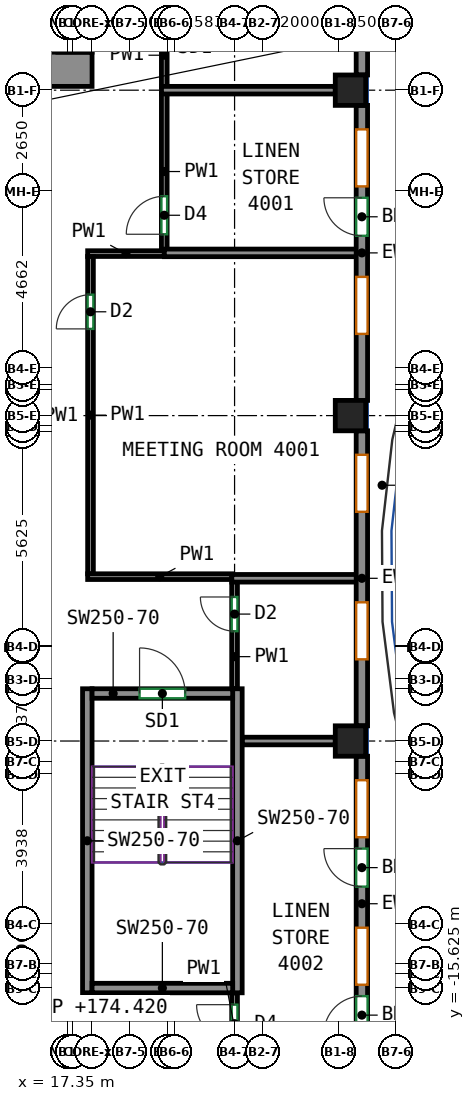
"""IFC4 building model, lengths in metres.
Left out: names, types, materials, properties, quantities, classifications, styles, units other than length and angle.
Written with IfcOpenShell. Run it as: python <this file> out.ifc"""

import sys

from ifc_helpers import new_model, si_unit, direction, frame, frame_2d, origin, origin_2d, place, context, subcontext, project, spatial, rectangle, extrude, source, transform, mapped, element, fill, save


model = new_model("IFC4")
c1 = context("Model", 3, precision=1e-05, world=origin(), true_north=direction((0.0, 1.0)))
c2 = subcontext(c1, "Body", "Model", "MODEL_VIEW")
j1 = project(units=[si_unit("LENGTHUNIT", "METRE"), si_unit("PLANEANGLEUNIT", "RADIAN")], contexts=[c1])
p1 = place(None, origin())
s1 = spatial("IfcSite", under=j1, at=p1, CompositionType="ELEMENT")
p2 = place(p1, origin())
s2 = spatial("IfcBuilding", under=s1, at=p2, CompositionType="ELEMENT")
p3 = place(p2, frame((0.0, 0.0, 171.9)))
s3 = spatial("IfcBuildingStorey", under=s2, at=p3, CompositionType="ELEMENT", Elevation=171.9)
m1 = source(origin(), c2, "Body", "SweptSolid", [
    extrude(rectangle(XDim=0.8, YDim=0.8, at=origin_2d()), origin(), (0.0, 0.0, 1.0), 3.12),
])
for number, where, z_axis, x_axis in (
    (1, (24.8, -9.125, 0.0), (0.0, 0.0, 1.0), (1.0, 0.0, 0.0)),
    (2, (24.8, -0.562, 0.0), (0.0, 0.0, 1.0), (1.0, 0.0, 0.0)),
    (3, (24.8, 8.0, 0.0), (0.0, 0.0, 1.0), (1.0, 0.0, 0.0)),
):
    element("IfcColumn", number, at=place(p3, frame(where, z_axis=z_axis, x_axis=x_axis)), inside=s3, PredefinedType="COLUMN", context=c2, shape_type="MappedRepresentation", body=[
        mapped(m1, transform((0.0, 0.0, 0.0))),
    ])
m2 = source(origin(), c2, "Body", "SweptSolid", [
    extrude(rectangle(XDim=5.53, YDim=0.9, at=frame_2d((2.765, 0.0))), origin(), (0.0, 0.0, 1.0), 3.12),
])
p4 = place(p3, frame((12.47, 8.55, 0.0), z_axis=(0.0, 0.0, 1.0), x_axis=(1.0, 0.0, 0.0)))
e4 = element("IfcWall", 4, at=p4, inside=s3, PredefinedType="SHEAR", context=c2, shape_type="MappedRepresentation", body=[
    mapped(m2, transform((0.0, 0.0, 0.0))),
])
p5 = place(p4, frame((2.18, 0.0, 0.0)))
e5 = element("IfcOpeningElement", 5, at=p5, cuts=e4, PredefinedType="OPENING", context=c2, shape_type="SweptSolid", body=[
    extrude(rectangle(XDim=1.2, YDim=2.1, at=frame_2d((0.6, 1.05))), frame((0.0, 0.46, 0.0), z_axis=(0.0, -1.0, 0.0), x_axis=(1.0, 0.0, 0.0)), (0.0, 0.0, 1.0), 0.92),
])
m3 = source(origin(), c2, "Body", "SweptSolid", [
    extrude(rectangle(XDim=8.0, YDim=0.25, at=frame_2d((4.0, 0.0))), origin(), (0.0, 0.0, 1.0), 3.12),
])
for number, where, z_axis, x_axis in (
    (6, (17.875, -15.75, 0.0), (0.0, 0.0, 1.0), (0.0, 1.0, 0.0)),
    (7, (21.825, -15.75, 0.0), (0.0, 0.0, 1.0), (0.0, 1.0, 0.0)),
):
    element("IfcWall", number, at=place(p3, frame(where, z_axis=z_axis, x_axis=x_axis)), inside=s3, PredefinedType="SHEAR", context=c2, shape_type="MappedRepresentation", body=[
        mapped(m3, transform((0.0, 0.0, 0.0))),
    ])
m4 = source(origin(), c2, "Body", "SweptSolid", [
    extrude(rectangle(XDim=3.7, YDim=0.25, at=frame_2d((1.85, 0.0))), origin(), (0.0, 0.0, 1.0), 3.12),
])
p6 = place(p3, frame((18.0, -15.625, 0.0), z_axis=(0.0, 0.0, 1.0), x_axis=(1.0, 0.0, 0.0)))
e8 = element("IfcWall", 8, at=p6, inside=s3, PredefinedType="SHEAR", context=c2, shape_type="MappedRepresentation", body=[
    mapped(m4, transform((0.0, 0.0, 0.0))),
])
p7 = place(p3, frame((18.0, -7.875, 0.0), z_axis=(0.0, 0.0, 1.0), x_axis=(1.0, 0.0, 0.0)))
e9 = element("IfcWall", 9, at=p7, inside=s3, PredefinedType="SHEAR", context=c2, shape_type="MappedRepresentation", body=[
    mapped(m4, transform((0.0, 0.0, 0.0))),
])
p8 = place(p7, frame((1.25, 0.0, 0.0)))
e10 = element("IfcOpeningElement", 10, at=p8, cuts=e9, PredefinedType="OPENING", context=c2, shape_type="SweptSolid", body=[
    extrude(rectangle(XDim=1.2, YDim=2.1, at=frame_2d((0.6, 1.05))), frame((0.0, 0.135, 0.0), z_axis=(0.0, -1.0, 0.0), x_axis=(1.0, 0.0, 0.0)), (0.0, 0.0, 1.0), 0.27),
])
m5 = source(origin(), c2, "Body", "SweptSolid", [
    extrude(rectangle(XDim=7.763, YDim=0.3, at=frame_2d((3.881, 0.0))), origin(), (0.0, 0.0, 1.0), 3.12),
])
p9 = place(p3, frame((25.1, -17.288, 0.0), z_axis=(0.0, 0.0, 1.0), x_axis=(0.0, 1.0, 0.0)))
e11 = element("IfcWall", 11, at=p9, inside=s3, PredefinedType="SOLIDWALL", context=c2, shape_type="MappedRepresentation", body=[
    mapped(m5, transform((0.0, 0.0, 0.0))),
])
p10 = place(p9, frame((1.75, 0.0, 0.85)))
e12 = element("IfcOpeningElement", 12, at=p10, cuts=e11, PredefinedType="OPENING", context=c2, shape_type="SweptSolid", body=[
    extrude(rectangle(XDim=1.5, YDim=1.95, at=frame_2d((0.75, 0.975))), frame((0.0, 0.16, 0.0), z_axis=(0.0, -1.0, 0.0), x_axis=(1.0, 0.0, 0.0)), (0.0, 0.0, 1.0), 0.32),
])
p11 = place(p9, frame((0.45, 0.0, 0.0)))
e13 = element("IfcOpeningElement", 13, at=p11, cuts=e11, PredefinedType="OPENING", context=c2, shape_type="SweptSolid", body=[
    extrude(rectangle(XDim=1.0, YDim=2.1, at=frame_2d((0.5, 1.05))), frame((0.0, 0.16, 0.0), z_axis=(0.0, -1.0, 0.0), x_axis=(1.0, 0.0, 0.0)), (0.0, 0.0, 1.0), 0.32),
])
p12 = place(p9, frame((5.631, 0.0, 0.85)))
e14 = element("IfcOpeningElement", 14, at=p12, cuts=e11, PredefinedType="OPENING", context=c2, shape_type="SweptSolid", body=[
    extrude(rectangle(XDim=1.5, YDim=1.95, at=frame_2d((0.75, 0.975))), frame((0.0, 0.16, 0.0), z_axis=(0.0, -1.0, 0.0), x_axis=(1.0, 0.0, 0.0)), (0.0, 0.0, 1.0), 0.32),
])
p13 = place(p9, frame((4.331, 0.0, 0.0)))
e15 = element("IfcOpeningElement", 15, at=p13, cuts=e11, PredefinedType="OPENING", context=c2, shape_type="SweptSolid", body=[
    extrude(rectangle(XDim=1.0, YDim=2.1, at=frame_2d((0.5, 1.05))), frame((0.0, 0.16, 0.0), z_axis=(0.0, -1.0, 0.0), x_axis=(1.0, 0.0, 0.0)), (0.0, 0.0, 1.0), 0.32),
])
p14 = place(p3, frame((25.1, -8.725, 0.0), z_axis=(0.0, 0.0, 1.0), x_axis=(0.0, 1.0, 0.0)))
e16 = element("IfcWall", 16, at=p14, inside=s3, PredefinedType="SOLIDWALL", context=c2, shape_type="MappedRepresentation", body=[
    mapped(m5, transform((0.0, 0.0, 0.0))),
])
p15 = place(p14, frame((1.75, 0.0, 0.85)))
e17 = element("IfcOpeningElement", 17, at=p15, cuts=e16, PredefinedType="OPENING", context=c2, shape_type="SweptSolid", body=[
    extrude(rectangle(XDim=1.5, YDim=1.95, at=frame_2d((0.75, 0.975))), frame((0.0, 0.16, 0.0), z_axis=(0.0, -1.0, 0.0), x_axis=(1.0, 0.0, 0.0)), (0.0, 0.0, 1.0), 0.32),
])
p16 = place(p14, frame((5.631, 0.0, 0.85)))
e18 = element("IfcOpeningElement", 18, at=p16, cuts=e16, PredefinedType="OPENING", context=c2, shape_type="SweptSolid", body=[
    extrude(rectangle(XDim=1.5, YDim=1.95, at=frame_2d((0.75, 0.975))), frame((0.0, 0.16, 0.0), z_axis=(0.0, -1.0, 0.0), x_axis=(1.0, 0.0, 0.0)), (0.0, 0.0, 1.0), 0.32),
])
p17 = place(p3, frame((25.1, -0.163, 0.0), z_axis=(0.0, 0.0, 1.0), x_axis=(0.0, 1.0, 0.0)))
e19 = element("IfcWall", 19, at=p17, inside=s3, PredefinedType="SOLIDWALL", context=c2, shape_type="MappedRepresentation", body=[
    mapped(m5, transform((0.0, 0.0, 0.0))),
])
p18 = place(p17, frame((1.75, 0.0, 0.85)))
e20 = element("IfcOpeningElement", 20, at=p18, cuts=e19, PredefinedType="OPENING", context=c2, shape_type="SweptSolid", body=[
    extrude(rectangle(XDim=1.5, YDim=1.95, at=frame_2d((0.75, 0.975))), frame((0.0, 0.16, 0.0), z_axis=(0.0, -1.0, 0.0), x_axis=(1.0, 0.0, 0.0)), (0.0, 0.0, 1.0), 0.32),
])
p19 = place(p17, frame((5.631, 0.0, 0.85)))
e21 = element("IfcOpeningElement", 21, at=p19, cuts=e19, PredefinedType="OPENING", context=c2, shape_type="SweptSolid", body=[
    extrude(rectangle(XDim=1.5, YDim=1.95, at=frame_2d((0.75, 0.975))), frame((0.0, 0.16, 0.0), z_axis=(0.0, -1.0, 0.0), x_axis=(1.0, 0.0, 0.0)), (0.0, 0.0, 1.0), 0.32),
])
p20 = place(p17, frame((4.331, 0.0, 0.0)))
e22 = element("IfcOpeningElement", 22, at=p20, cuts=e19, PredefinedType="OPENING", context=c2, shape_type="SweptSolid", body=[
    extrude(rectangle(XDim=1.0, YDim=2.1, at=frame_2d((0.5, 1.05))), frame((0.0, 0.16, 0.0), z_axis=(0.0, -1.0, 0.0), x_axis=(1.0, 0.0, 0.0)), (0.0, 0.0, 1.0), 0.32),
])
m6 = source(origin(), c2, "Body", "SweptSolid", [
    extrude(rectangle(XDim=13.95, YDim=0.3, at=frame_2d((6.975, 0.0))), origin(), (0.0, 0.0, 1.0), 3.12),
])
p21 = place(p3, frame((25.1, 8.4, 0.0), z_axis=(0.0, 0.0, 1.0), x_axis=(0.0, 1.0, 0.0)))
e23 = element("IfcWall", 23, at=p21, inside=s3, PredefinedType="SOLIDWALL", context=c2, shape_type="MappedRepresentation", body=[
    mapped(m6, transform((0.0, 0.0, 0.0))),
])
p22 = place(p21, frame((0.994, 0.0, 0.85)))
e24 = element("IfcOpeningElement", 24, at=p22, cuts=e23, PredefinedType="OPENING", context=c2, shape_type="SweptSolid", body=[
    extrude(rectangle(XDim=1.5, YDim=1.95, at=frame_2d((0.75, 0.975))), frame((0.0, 0.16, 0.0), z_axis=(0.0, -1.0, 0.0), x_axis=(1.0, 0.0, 0.0)), (0.0, 0.0, 1.0), 0.32),
])
p23 = place(p21, frame((4.481, 0.0, 0.85)))
e25 = element("IfcOpeningElement", 25, at=p23, cuts=e23, PredefinedType="OPENING", context=c2, shape_type="SweptSolid", body=[
    extrude(rectangle(XDim=1.5, YDim=1.95, at=frame_2d((0.75, 0.975))), frame((0.0, 0.16, 0.0), z_axis=(0.0, -1.0, 0.0), x_axis=(1.0, 0.0, 0.0)), (0.0, 0.0, 1.0), 0.32),
])
p24 = place(p21, frame((7.969, 0.0, 0.85)))
e26 = element("IfcOpeningElement", 26, at=p24, cuts=e23, PredefinedType="OPENING", context=c2, shape_type="SweptSolid", body=[
    extrude(rectangle(XDim=1.5, YDim=1.95, at=frame_2d((0.75, 0.975))), frame((0.0, 0.16, 0.0), z_axis=(0.0, -1.0, 0.0), x_axis=(1.0, 0.0, 0.0)), (0.0, 0.0, 1.0), 0.32),
])
p25 = place(p21, frame((11.456, 0.0, 0.85)))
e27 = element("IfcOpeningElement", 27, at=p25, cuts=e23, PredefinedType="OPENING", context=c2, shape_type="SweptSolid", body=[
    extrude(rectangle(XDim=1.5, YDim=1.95, at=frame_2d((0.75, 0.975))), frame((0.0, 0.16, 0.0), z_axis=(0.0, -1.0, 0.0), x_axis=(1.0, 0.0, 0.0)), (0.0, 0.0, 1.0), 0.32),
])
p26 = place(p3, frame((19.9, 3.809, 0.0), z_axis=(0.0, 0.0, 1.0), x_axis=(0.0, 1.0, 0.0)))
e28 = element("IfcWall", 28, at=p26, inside=s3, PredefinedType="PARTITIONING", context=c2, shape_type="SweptSolid", body=[
    extrude(rectangle(XDim=4.101, YDim=0.15, at=frame_2d((2.05, 0.0))), origin(), (0.0, 0.0, 1.0), 3.12),
])
p27 = place(p26, frame((0.4, 0.0, 0.0)))
e29 = element("IfcOpeningElement", 29, at=p27, cuts=e28, PredefinedType="OPENING", context=c2, shape_type="SweptSolid", body=[
    extrude(rectangle(XDim=1.0, YDim=2.1, at=frame_2d((0.5, 1.05))), frame((0.0, 0.085, 0.0), z_axis=(0.0, -1.0, 0.0), x_axis=(1.0, 0.0, 0.0)), (0.0, 0.0, 1.0), 0.17),
])
p28 = place(p3, frame((19.9, 8.09, 0.0), z_axis=(0.0, 0.0, 1.0), x_axis=(0.0, 1.0, 0.0)))
e30 = element("IfcWall", 30, at=p28, inside=s3, PredefinedType="PARTITIONING", context=c2, shape_type="SweptSolid", body=[
    extrude(rectangle(XDim=1.66, YDim=0.15, at=frame_2d((0.83, 0.0))), origin(), (0.0, 0.0, 1.0), 3.12),
])
p29 = place(p3, frame((17.884, 3.7, 0.0), z_axis=(0.0, 0.0, 1.0), x_axis=(1.0, 0.0, 0.0)))
e31 = element("IfcWall", 31, at=p29, inside=s3, PredefinedType="PARTITIONING", context=c2, shape_type="SweptSolid", body=[
    extrude(rectangle(XDim=2.016, YDim=0.15, at=frame_2d((1.008, 0.0))), origin(), (0.0, 0.0, 1.0), 3.12),
])
p30 = place(p3, frame((17.959, -4.725, 0.0), z_axis=(0.0, 0.0, 1.0), x_axis=(0.0, 1.0, 0.0)))
e32 = element("IfcWall", 32, at=p30, inside=s3, PredefinedType="PARTITIONING", context=c2, shape_type="SweptSolid", body=[
    extrude(rectangle(XDim=8.35, YDim=0.15, at=frame_2d((4.175, 0.0))), origin(), (0.0, 0.0, 1.0), 3.12),
])
p31 = place(p30, frame((6.444, 0.0, 0.0)))
e33 = element("IfcOpeningElement", 33, at=p31, cuts=e32, PredefinedType="OPENING", context=c2, shape_type="SweptSolid", body=[
    extrude(rectangle(XDim=0.9, YDim=2.1, at=frame_2d((0.45, 1.05))), frame((0.0, 0.085, 0.0), z_axis=(0.0, -1.0, 0.0), x_axis=(1.0, 0.0, 0.0)), (0.0, 0.0, 1.0), 0.17),
])
p32 = place(p3, frame((17.884, -4.8, 0.0), z_axis=(0.0, 0.0, 1.0), x_axis=(1.0, 0.0, 0.0)))
e34 = element("IfcWall", 34, at=p32, inside=s3, PredefinedType="PARTITIONING", context=c2, shape_type="SweptSolid", body=[
    extrude(rectangle(XDim=3.793, YDim=0.15, at=frame_2d((1.896, 0.0))), origin(), (0.0, 0.0, 1.0), 3.12),
])
p33 = place(p3, frame((21.75, -7.75, 0.0), z_axis=(0.0, 0.0, 1.0), x_axis=(0.0, 1.0, 0.0)))
e35 = element("IfcWall", 35, at=p33, inside=s3, PredefinedType="PARTITIONING", context=c2, shape_type="SweptSolid", body=[
    extrude(rectangle(XDim=2.817, YDim=0.15, at=frame_2d((1.408, 0.0))), origin(), (0.0, 0.0, 1.0), 3.12),
])
p34 = place(p33, frame((1.515, 0.0, 0.0)))
e36 = element("IfcOpeningElement", 36, at=p34, cuts=e35, PredefinedType="OPENING", context=c2, shape_type="SweptSolid", body=[
    extrude(rectangle(XDim=0.9, YDim=2.1, at=frame_2d((0.45, 1.05))), frame((0.0, 0.085, 0.0), z_axis=(0.0, -1.0, 0.0), x_axis=(1.0, 0.0, 0.0)), (0.0, 0.0, 1.0), 0.17),
])
p35 = place(p3, frame((21.75, -17.598, 0.0), z_axis=(0.0, 0.0, 1.0), x_axis=(0.0, 1.0, 0.0)))
e37 = element("IfcWall", 37, at=p35, inside=s3, PredefinedType="PARTITIONING", context=c2, shape_type="SweptSolid", body=[
    extrude(rectangle(XDim=1.848, YDim=0.15, at=frame_2d((0.924, 0.0))), origin(), (0.0, 0.0, 1.0), 3.12),
])
p36 = place(p35, frame((0.536, 0.0, 0.0)))
e38 = element("IfcOpeningElement", 38, at=p36, cuts=e37, PredefinedType="OPENING", context=c2, shape_type="SweptSolid", body=[
    extrude(rectangle(XDim=1.0, YDim=2.1, at=frame_2d((0.5, 1.05))), frame((0.0, 0.085, 0.0), z_axis=(0.0, -1.0, 0.0), x_axis=(1.0, 0.0, 0.0)), (0.0, 0.0, 1.0), 0.17),
])
p37 = place(p3, frame((19.827, 8.0, 0.0), z_axis=(0.0, 0.0, 1.0), x_axis=(1.0, 0.0, 0.0)))
e39 = element("IfcWall", 39, at=p37, inside=s3, PredefinedType="PARTITIONING", context=c2, shape_type="SweptSolid", body=[
    extrude(rectangle(XDim=4.573, YDim=0.2, at=frame_2d((2.287, 0.0))), origin(), (0.0, 0.0, 1.0), 3.12),
])
p38 = place(p3, frame((19.902, 3.719, 0.0), z_axis=(0.0, 0.0, 1.0), x_axis=(1.0, 0.0, 0.0)))
e40 = element("IfcWall", 40, at=p38, inside=s3, PredefinedType="PARTITIONING", context=c2, shape_type="SweptSolid", body=[
    extrude(rectangle(XDim=5.098, YDim=0.2, at=frame_2d((2.549, 0.0))), origin(), (0.0, 0.0, 1.0), 3.12),
])
p39 = place(p3, frame((21.677, -4.843, 0.0), z_axis=(0.0, 0.0, 1.0), x_axis=(1.0, 0.0, 0.0)))
e41 = element("IfcWall", 41, at=p39, inside=s3, PredefinedType="PARTITIONING", context=c2, shape_type="SweptSolid", body=[
    extrude(rectangle(XDim=3.323, YDim=0.2, at=frame_2d((1.662, 0.0))), origin(), (0.0, 0.0, 1.0), 3.12),
])
p40 = place(p3, frame((21.95, -9.125, 0.0), z_axis=(0.0, 0.0, 1.0), x_axis=(1.0, 0.0, 0.0)))
e42 = element("IfcWall", 42, at=p40, inside=s3, PredefinedType="PARTITIONING", context=c2, shape_type="SweptSolid", body=[
    extrude(rectangle(XDim=2.45, YDim=0.2, at=frame_2d((1.225, 0.0))), origin(), (0.0, 0.0, 1.0), 3.12),
])
p41 = place(p10, origin())
e43 = element("IfcWindow", 43, at=p41, inside=s3, PartitioningType="SINGLE_PANEL", PredefinedType="WINDOW", context=c2, shape_type="SweptSolid", body=[
    extrude(rectangle(XDim=1.5, YDim=1.95, at=frame_2d((0.75, 0.975))), frame((0.0, 0.03, 0.0), z_axis=(0.0, -1.0, 0.0), x_axis=(1.0, 0.0, 0.0)), (0.0, 0.0, 1.0), 0.06),
])
fill(e12, e43)
p42 = place(p11, origin())
e44 = element("IfcDoor", 44, at=p42, inside=s3, OperationType="SINGLE_SWING_LEFT", PredefinedType="DOOR", context=c2, shape_type="SweptSolid", body=[
    extrude(rectangle(XDim=1.0, YDim=2.1, at=frame_2d((0.5, 1.05))), frame((0.0, 0.025, 0.0), z_axis=(0.0, -1.0, 0.0), x_axis=(1.0, 0.0, 0.0)), (0.0, 0.0, 1.0), 0.05),
])
fill(e13, e44)
p43 = place(p12, origin())
e45 = element("IfcWindow", 45, at=p43, inside=s3, PartitioningType="SINGLE_PANEL", PredefinedType="WINDOW", context=c2, shape_type="SweptSolid", body=[
    extrude(rectangle(XDim=1.5, YDim=1.95, at=frame_2d((0.75, 0.975))), frame((0.0, 0.03, 0.0), z_axis=(0.0, -1.0, 0.0), x_axis=(1.0, 0.0, 0.0)), (0.0, 0.0, 1.0), 0.06),
])
fill(e14, e45)
p44 = place(p13, origin())
e46 = element("IfcDoor", 46, at=p44, inside=s3, OperationType="SINGLE_SWING_RIGHT", PredefinedType="DOOR", context=c2, shape_type="SweptSolid", body=[
    extrude(rectangle(XDim=1.0, YDim=2.1, at=frame_2d((0.5, 1.05))), frame((0.0, 0.025, 0.0), z_axis=(0.0, -1.0, 0.0), x_axis=(1.0, 0.0, 0.0)), (0.0, 0.0, 1.0), 0.05),
])
fill(e15, e46)
p45 = place(p15, origin())
e47 = element("IfcWindow", 47, at=p45, inside=s3, PartitioningType="SINGLE_PANEL", PredefinedType="WINDOW", context=c2, shape_type="SweptSolid", body=[
    extrude(rectangle(XDim=1.5, YDim=1.95, at=frame_2d((0.75, 0.975))), frame((0.0, 0.03, 0.0), z_axis=(0.0, -1.0, 0.0), x_axis=(1.0, 0.0, 0.0)), (0.0, 0.0, 1.0), 0.06),
])
fill(e17, e47)
p46 = place(p16, origin())
e48 = element("IfcWindow", 48, at=p46, inside=s3, PartitioningType="SINGLE_PANEL", PredefinedType="WINDOW", context=c2, shape_type="SweptSolid", body=[
    extrude(rectangle(XDim=1.5, YDim=1.95, at=frame_2d((0.75, 0.975))), frame((0.0, 0.03, 0.0), z_axis=(0.0, -1.0, 0.0), x_axis=(1.0, 0.0, 0.0)), (0.0, 0.0, 1.0), 0.06),
])
fill(e18, e48)
p47 = place(p18, origin())
e49 = element("IfcWindow", 49, at=p47, inside=s3, PartitioningType="SINGLE_PANEL", PredefinedType="WINDOW", context=c2, shape_type="SweptSolid", body=[
    extrude(rectangle(XDim=1.5, YDim=1.95, at=frame_2d((0.75, 0.975))), frame((0.0, 0.03, 0.0), z_axis=(0.0, -1.0, 0.0), x_axis=(1.0, 0.0, 0.0)), (0.0, 0.0, 1.0), 0.06),
])
fill(e20, e49)
p48 = place(p19, origin())
e50 = element("IfcWindow", 50, at=p48, inside=s3, PartitioningType="SINGLE_PANEL", PredefinedType="WINDOW", context=c2, shape_type="SweptSolid", body=[
    extrude(rectangle(XDim=1.5, YDim=1.95, at=frame_2d((0.75, 0.975))), frame((0.0, 0.03, 0.0), z_axis=(0.0, -1.0, 0.0), x_axis=(1.0, 0.0, 0.0)), (0.0, 0.0, 1.0), 0.06),
])
fill(e21, e50)
p49 = place(p20, origin())
e51 = element("IfcDoor", 51, at=p49, inside=s3, OperationType="SINGLE_SWING_RIGHT", PredefinedType="DOOR", context=c2, shape_type="SweptSolid", body=[
    extrude(rectangle(XDim=1.0, YDim=2.1, at=frame_2d((0.5, 1.05))), frame((0.0, 0.025, 0.0), z_axis=(0.0, -1.0, 0.0), x_axis=(1.0, 0.0, 0.0)), (0.0, 0.0, 1.0), 0.05),
])
fill(e22, e51)
p50 = place(p8, origin())
e52 = element("IfcDoor", 52, at=p50, inside=s3, OperationType="DOUBLE_DOOR_SINGLE_SWING", PredefinedType="DOOR", context=c2, shape_type="SweptSolid", body=[
    extrude(rectangle(XDim=1.2, YDim=2.1, at=frame_2d((0.6, 1.05))), frame((0.0, 0.025, 0.0), z_axis=(0.0, -1.0, 0.0), x_axis=(1.0, 0.0, 0.0)), (0.0, 0.0, 1.0), 0.05),
])
fill(e10, e52)
p51 = place(p36, origin())
e53 = element("IfcDoor", 53, at=p51, inside=s3, OperationType="SINGLE_SWING_RIGHT", PredefinedType="DOOR", context=c2, shape_type="SweptSolid", body=[
    extrude(rectangle(XDim=1.0, YDim=2.1, at=frame_2d((0.5, 1.05))), frame((0.0, 0.025, 0.0), z_axis=(0.0, -1.0, 0.0), x_axis=(1.0, 0.0, 0.0)), (0.0, 0.0, 1.0), 0.05),
])
fill(e38, e53)
p52 = place(p34, origin())
e54 = element("IfcDoor", 54, at=p52, inside=s3, OperationType="SINGLE_SWING_RIGHT", PredefinedType="DOOR", context=c2, shape_type="SweptSolid", body=[
    extrude(rectangle(XDim=0.9, YDim=2.1, at=frame_2d((0.45, 1.05))), frame((0.0, 0.025, 0.0), z_axis=(0.0, -1.0, 0.0), x_axis=(1.0, 0.0, 0.0)), (0.0, 0.0, 1.0), 0.05),
])
fill(e36, e54)
p53 = place(p31, origin())
e55 = element("IfcDoor", 55, at=p53, inside=s3, OperationType="SINGLE_SWING_LEFT", PredefinedType="DOOR", context=c2, shape_type="SweptSolid", body=[
    extrude(rectangle(XDim=0.9, YDim=2.1, at=frame_2d((0.45, 1.05))), frame((0.0, 0.025, 0.0), z_axis=(0.0, -1.0, 0.0), x_axis=(1.0, 0.0, 0.0)), (0.0, 0.0, 1.0), 0.05),
])
fill(e33, e55)
p54 = place(p27, origin())
e56 = element("IfcDoor", 56, at=p54, inside=s3, OperationType="SINGLE_SWING_LEFT", PredefinedType="DOOR", context=c2, shape_type="SweptSolid", body=[
    extrude(rectangle(XDim=1.0, YDim=2.1, at=frame_2d((0.5, 1.05))), frame((0.0, 0.025, 0.0), z_axis=(0.0, -1.0, 0.0), x_axis=(1.0, 0.0, 0.0)), (0.0, 0.0, 1.0), 0.05),
])
fill(e29, e56)
save(model, sys.argv[1])
